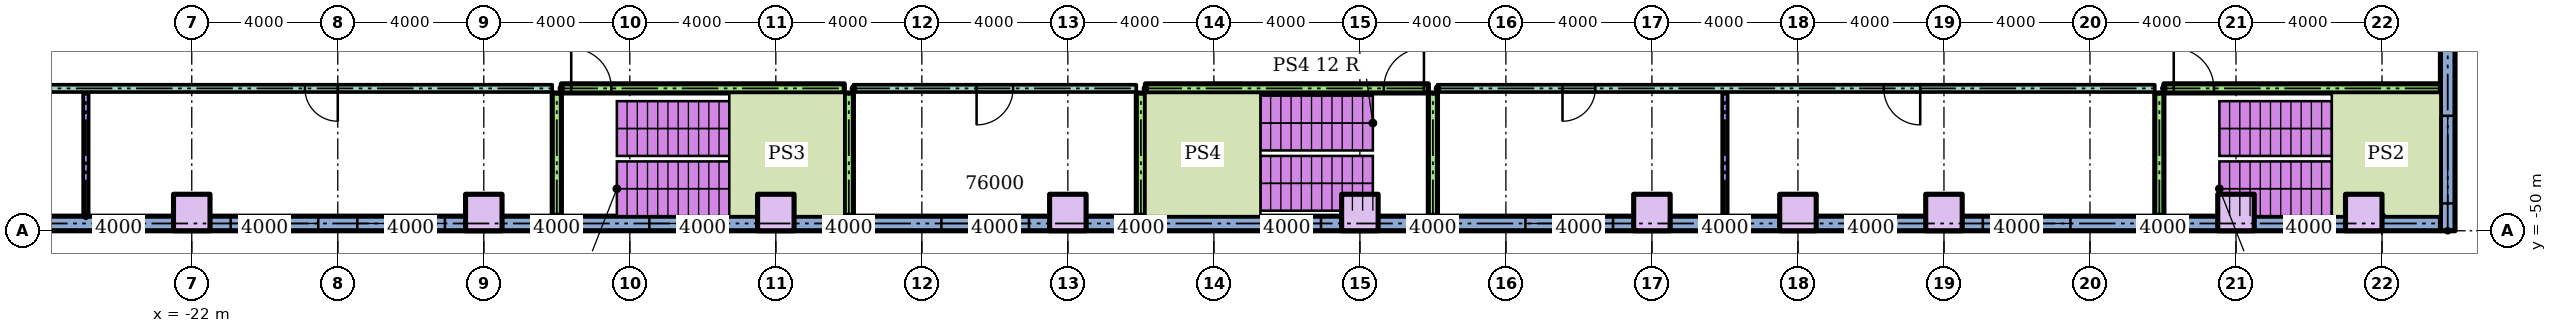
"""IFC4 building model, lengths in metres.
Left out: names, types, materials, properties, quantities, classifications, styles, units other than length and angle.
Written with IfcOpenShell. Run it as: python <this file> out.ifc"""

import sys

from ifc_helpers import new_model, si_unit, direction, frame, frame_2d, origin, origin_2d, place, context, subcontext, project, spatial, rectangle, extrude, element, fill, save


model = new_model("IFC4")
c1 = context("Model", 3, precision=1e-05, world=origin(), true_north=direction((0.0, 1.0)))
c2 = subcontext(c1, "Body", "Model", "MODEL_VIEW")
j1 = project(units=[si_unit("LENGTHUNIT", "METRE"), si_unit("PLANEANGLEUNIT", "RADIAN")], contexts=[c1])
p1 = place(None, origin())
s1 = spatial("IfcSite", under=j1, at=p1, CompositionType="ELEMENT")
p2 = place(p1, origin())
s2 = spatial("IfcBuilding", under=s1, at=p2, CompositionType="ELEMENT")
p3 = place(p2, frame((0.0, 0.0, 6.0)))
s3 = spatial("IfcBuildingStorey", under=s2, at=p3, CompositionType="ELEMENT", Elevation=6.0)
for number, where in (
    (1, (-22.0, -49.5, 0.0)),
    (2, (-14.0, -49.5, 0.0)),
    (3, (-6.0, -49.5, 0.0)),
    (4, (2.0, -49.5, 0.0)),
    (5, (10.0, -49.5, 0.0)),
    (6, (18.0, -49.5, 0.0)),
    (7, (22.0, -49.5, 0.0)),
    (8, (26.0, -49.5, 0.0)),
    (9, (34.0, -49.5, 0.0)),
    (10, (37.5, -49.5, 0.0)),
):
    element("IfcColumn", number, at=place(p3, frame(where)), inside=s3, PredefinedType="COLUMN", context=c2, shape_type="SweptSolid", body=[
        extrude(rectangle(XDim=1.0, YDim=1.0, at=origin_2d()), origin(), (0.0, 0.0, 1.0), 4.0),
    ])
p4 = place(p3, frame((39.8, -50.0, 0.0), z_axis=(0.0, 0.0, 1.0), x_axis=(0.0, 1.0, 0.0)))
e11 = element("IfcWall", 11, at=p4, inside=s3, PredefinedType="STANDARD", context=c2, shape_type="SweptSolid", body=[
    extrude(rectangle(XDim=70.0, YDim=0.4, at=frame_2d((35.0, 0.0))), origin(), (0.0, 0.0, 1.0), 3.7),
])
p5 = place(p4, frame((0.75, 0.0, 0.9)))
e12 = element("IfcOpeningElement", 12, at=p5, cuts=e11, PredefinedType="OPENING", context=c2, shape_type="SweptSolid", body=[
    extrude(rectangle(XDim=2.4, YDim=2.1, at=frame_2d((1.2, 1.05))), frame((0.0, 0.21, 0.0), z_axis=(0.0, -1.0, 0.0), x_axis=(1.0, 0.0, 0.0)), (0.0, 0.0, 1.0), 0.42),
])
p6 = place(p4, frame((6.633, 0.0, 0.9)))
e13 = element("IfcOpeningElement", 13, at=p6, cuts=e11, PredefinedType="OPENING", context=c2, shape_type="SweptSolid", body=[
    extrude(rectangle(XDim=2.4, YDim=2.1, at=frame_2d((1.2, 1.05))), frame((0.0, 0.21, 0.0), z_axis=(0.0, -1.0, 0.0), x_axis=(1.0, 0.0, 0.0)), (0.0, 0.0, 1.0), 0.42),
])
p7 = place(p4, frame((10.3, 0.0, 0.9)))
e14 = element("IfcOpeningElement", 14, at=p7, cuts=e11, PredefinedType="OPENING", context=c2, shape_type="SweptSolid", body=[
    extrude(rectangle(XDim=2.4, YDim=2.1, at=frame_2d((1.2, 1.05))), frame((0.0, 0.21, 0.0), z_axis=(0.0, -1.0, 0.0), x_axis=(1.0, 0.0, 0.0)), (0.0, 0.0, 1.0), 0.42),
])
p8 = place(p4, frame((13.967, 0.0, 0.9)))
e15 = element("IfcOpeningElement", 15, at=p8, cuts=e11, PredefinedType="OPENING", context=c2, shape_type="SweptSolid", body=[
    extrude(rectangle(XDim=2.4, YDim=2.1, at=frame_2d((1.2, 1.05))), frame((0.0, 0.21, 0.0), z_axis=(0.0, -1.0, 0.0), x_axis=(1.0, 0.0, 0.0)), (0.0, 0.0, 1.0), 0.42),
])
p9 = place(p4, frame((28.863, 0.0, 0.9)))
e16 = element("IfcOpeningElement", 16, at=p9, cuts=e11, PredefinedType="OPENING", context=c2, shape_type="SweptSolid", body=[
    extrude(rectangle(XDim=2.4, YDim=2.1, at=frame_2d((1.2, 1.05))), frame((0.0, 0.21, 0.0), z_axis=(0.0, -1.0, 0.0), x_axis=(1.0, 0.0, 0.0)), (0.0, 0.0, 1.0), 0.42),
])
p10 = place(p4, frame((32.988, 0.0, 0.9)))
e17 = element("IfcOpeningElement", 17, at=p10, cuts=e11, PredefinedType="OPENING", context=c2, shape_type="SweptSolid", body=[
    extrude(rectangle(XDim=2.4, YDim=2.1, at=frame_2d((1.2, 1.05))), frame((0.0, 0.21, 0.0), z_axis=(0.0, -1.0, 0.0), x_axis=(1.0, 0.0, 0.0)), (0.0, 0.0, 1.0), 0.42),
])
p11 = place(p4, frame((37.113, 0.0, 0.9)))
e18 = element("IfcOpeningElement", 18, at=p11, cuts=e11, PredefinedType="OPENING", context=c2, shape_type="SweptSolid", body=[
    extrude(rectangle(XDim=2.4, YDim=2.1, at=frame_2d((1.2, 1.05))), frame((0.0, 0.21, 0.0), z_axis=(0.0, -1.0, 0.0), x_axis=(1.0, 0.0, 0.0)), (0.0, 0.0, 1.0), 0.42),
])
p12 = place(p4, frame((41.238, 0.0, 0.9)))
e19 = element("IfcOpeningElement", 19, at=p12, cuts=e11, PredefinedType="OPENING", context=c2, shape_type="SweptSolid", body=[
    extrude(rectangle(XDim=2.4, YDim=2.1, at=frame_2d((1.2, 1.05))), frame((0.0, 0.21, 0.0), z_axis=(0.0, -1.0, 0.0), x_axis=(1.0, 0.0, 0.0)), (0.0, 0.0, 1.0), 0.42),
])
p13 = place(p4, frame((45.363, 0.0, 0.9)))
e20 = element("IfcOpeningElement", 20, at=p13, cuts=e11, PredefinedType="OPENING", context=c2, shape_type="SweptSolid", body=[
    extrude(rectangle(XDim=2.4, YDim=2.1, at=frame_2d((1.2, 1.05))), frame((0.0, 0.21, 0.0), z_axis=(0.0, -1.0, 0.0), x_axis=(1.0, 0.0, 0.0)), (0.0, 0.0, 1.0), 0.42),
])
p14 = place(p4, frame((49.488, 0.0, 0.9)))
e21 = element("IfcOpeningElement", 21, at=p14, cuts=e11, PredefinedType="OPENING", context=c2, shape_type="SweptSolid", body=[
    extrude(rectangle(XDim=2.4, YDim=2.1, at=frame_2d((1.2, 1.05))), frame((0.0, 0.21, 0.0), z_axis=(0.0, -1.0, 0.0), x_axis=(1.0, 0.0, 0.0)), (0.0, 0.0, 1.0), 0.42),
])
p15 = place(p4, frame((53.613, 0.0, 0.9)))
e22 = element("IfcOpeningElement", 22, at=p15, cuts=e11, PredefinedType="OPENING", context=c2, shape_type="SweptSolid", body=[
    extrude(rectangle(XDim=2.4, YDim=2.1, at=frame_2d((1.2, 1.05))), frame((0.0, 0.21, 0.0), z_axis=(0.0, -1.0, 0.0), x_axis=(1.0, 0.0, 0.0)), (0.0, 0.0, 1.0), 0.42),
])
p16 = place(p4, frame((57.738, 0.0, 0.9)))
e23 = element("IfcOpeningElement", 23, at=p16, cuts=e11, PredefinedType="OPENING", context=c2, shape_type="SweptSolid", body=[
    extrude(rectangle(XDim=2.4, YDim=2.1, at=frame_2d((1.2, 1.05))), frame((0.0, 0.21, 0.0), z_axis=(0.0, -1.0, 0.0), x_axis=(1.0, 0.0, 0.0)), (0.0, 0.0, 1.0), 0.42),
])
p17 = place(p4, frame((62.05, 0.0, 0.9)))
e24 = element("IfcOpeningElement", 24, at=p17, cuts=e11, PredefinedType="OPENING", context=c2, shape_type="SweptSolid", body=[
    extrude(rectangle(XDim=2.4, YDim=2.1, at=frame_2d((1.2, 1.05))), frame((0.0, 0.21, 0.0), z_axis=(0.0, -1.0, 0.0), x_axis=(1.0, 0.0, 0.0)), (0.0, 0.0, 1.0), 0.42),
])
p18 = place(p4, frame((66.55, 0.0, 0.9)))
e25 = element("IfcOpeningElement", 25, at=p18, cuts=e11, PredefinedType="OPENING", context=c2, shape_type="SweptSolid", body=[
    extrude(rectangle(XDim=2.4, YDim=2.1, at=frame_2d((1.2, 1.05))), frame((0.0, 0.21, 0.0), z_axis=(0.0, -1.0, 0.0), x_axis=(1.0, 0.0, 0.0)), (0.0, 0.0, 1.0), 0.42),
])
p19 = place(p3, frame((-39.6, -49.8, 0.0)))
e26 = element("IfcWall", 26, at=p19, inside=s3, PredefinedType="STANDARD", context=c2, shape_type="SweptSolid", body=[
    extrude(rectangle(XDim=79.2, YDim=0.4, at=frame_2d((39.6, 0.0))), origin(), (0.0, 0.0, 1.0), 3.7),
])
p20 = place(p19, frame((10.665, 0.0, 0.9)))
e27 = element("IfcOpeningElement", 27, at=p20, cuts=e26, PredefinedType="OPENING", context=c2, shape_type="SweptSolid", body=[
    extrude(rectangle(XDim=2.4, YDim=2.1, at=frame_2d((1.2, 1.05))), frame((0.0, 0.21, 0.0), z_axis=(0.0, -1.0, 0.0), x_axis=(1.0, 0.0, 0.0)), (0.0, 0.0, 1.0), 0.42),
])
p21 = place(p19, frame((18.665, 0.0, 0.9)))
e28 = element("IfcOpeningElement", 28, at=p21, cuts=e26, PredefinedType="OPENING", context=c2, shape_type="SweptSolid", body=[
    extrude(rectangle(XDim=2.4, YDim=2.1, at=frame_2d((1.2, 1.05))), frame((0.0, 0.21, 0.0), z_axis=(0.0, -1.0, 0.0), x_axis=(1.0, 0.0, 0.0)), (0.0, 0.0, 1.0), 0.42),
])
p22 = place(p19, frame((22.135, 0.0, 0.9)))
e29 = element("IfcOpeningElement", 29, at=p22, cuts=e26, PredefinedType="OPENING", context=c2, shape_type="SweptSolid", body=[
    extrude(rectangle(XDim=2.4, YDim=2.1, at=frame_2d((1.2, 1.05))), frame((0.0, 0.21, 0.0), z_axis=(0.0, -1.0, 0.0), x_axis=(1.0, 0.0, 0.0)), (0.0, 0.0, 1.0), 0.42),
])
p23 = place(p19, frame((30.135, 0.0, 0.9)))
e30 = element("IfcOpeningElement", 30, at=p23, cuts=e26, PredefinedType="OPENING", context=c2, shape_type="SweptSolid", body=[
    extrude(rectangle(XDim=2.05, YDim=2.1, at=frame_2d((1.025, 1.05))), frame((0.0, 0.21, 0.0), z_axis=(0.0, -1.0, 0.0), x_axis=(1.0, 0.0, 0.0)), (0.0, 0.0, 1.0), 0.42),
])
p24 = place(p19, frame((38.135, 0.0, 0.9)))
e31 = element("IfcOpeningElement", 31, at=p24, cuts=e26, PredefinedType="OPENING", context=c2, shape_type="SweptSolid", body=[
    extrude(rectangle(XDim=2.4, YDim=2.1, at=frame_2d((1.2, 1.05))), frame((0.0, 0.21, 0.0), z_axis=(0.0, -1.0, 0.0), x_axis=(1.0, 0.0, 0.0)), (0.0, 0.0, 1.0), 0.42),
])
p25 = place(p19, frame((47.015, 0.0, 0.9)))
e32 = element("IfcOpeningElement", 32, at=p25, cuts=e26, PredefinedType="OPENING", context=c2, shape_type="SweptSolid", body=[
    extrude(rectangle(XDim=1.52, YDim=2.1, at=frame_2d((0.76, 1.05))), frame((0.0, 0.21, 0.0), z_axis=(0.0, -1.0, 0.0), x_axis=(1.0, 0.0, 0.0)), (0.0, 0.0, 1.0), 0.42),
])
p26 = place(p19, frame((54.135, 0.0, 0.9)))
e33 = element("IfcOpeningElement", 33, at=p26, cuts=e26, PredefinedType="OPENING", context=c2, shape_type="SweptSolid", body=[
    extrude(rectangle(XDim=2.4, YDim=2.1, at=frame_2d((1.2, 1.05))), frame((0.0, 0.21, 0.0), z_axis=(0.0, -1.0, 0.0), x_axis=(1.0, 0.0, 0.0)), (0.0, 0.0, 1.0), 0.42),
])
p27 = place(p19, frame((66.665, 0.0, 0.9)))
e34 = element("IfcOpeningElement", 34, at=p27, cuts=e26, PredefinedType="OPENING", context=c2, shape_type="SweptSolid", body=[
    extrude(rectangle(XDim=2.4, YDim=2.1, at=frame_2d((1.2, 1.05))), frame((0.0, 0.21, 0.0), z_axis=(0.0, -1.0, 0.0), x_axis=(1.0, 0.0, 0.0)), (0.0, 0.0, 1.0), 0.42),
])
p28 = place(p3, frame((-31.775, -46.1, 0.0)))
e35 = element("IfcWall", 35, at=p28, inside=s3, PredefinedType="PARTITIONING", context=c2, shape_type="SweptSolid", body=[
    extrude(rectangle(XDim=19.65, YDim=0.2, at=frame_2d((9.825, 0.0))), origin(), (0.0, 0.0, 1.0), 3.7),
])
p29 = place(p28, frame((2.925, 0.0, 0.0)))
e36 = element("IfcOpeningElement", 36, at=p29, cuts=e35, PredefinedType="OPENING", context=c2, shape_type="SweptSolid", body=[
    extrude(rectangle(XDim=0.9, YDim=2.1, at=frame_2d((0.45, 1.05))), frame((0.0, 0.11, 0.0), z_axis=(0.0, -1.0, 0.0), x_axis=(1.0, 0.0, 0.0)), (0.0, 0.0, 1.0), 0.22),
])
p30 = place(p28, frame((12.875, 0.0, 0.0)))
e37 = element("IfcOpeningElement", 37, at=p30, cuts=e35, PredefinedType="OPENING", context=c2, shape_type="SweptSolid", body=[
    extrude(rectangle(XDim=0.9, YDim=2.1, at=frame_2d((0.45, 1.05))), frame((0.0, 0.11, 0.0), z_axis=(0.0, -1.0, 0.0), x_axis=(1.0, 0.0, 0.0)), (0.0, 0.0, 1.0), 0.22),
])
p31 = place(p3, frame((-3.875, -46.1, 0.0)))
e38 = element("IfcWall", 38, at=p31, inside=s3, PredefinedType="PARTITIONING", context=c2, shape_type="SweptSolid", body=[
    extrude(rectangle(XDim=7.75, YDim=0.2, at=frame_2d((3.875, 0.0))), origin(), (0.0, 0.0, 1.0), 3.7),
])
p32 = place(p31, frame((3.375, 0.0, 0.0)))
e39 = element("IfcOpeningElement", 39, at=p32, cuts=e38, PredefinedType="OPENING", context=c2, shape_type="SweptSolid", body=[
    extrude(rectangle(XDim=1.0, YDim=2.1, at=frame_2d((0.5, 1.05))), frame((0.0, 0.11, 0.0), z_axis=(0.0, -1.0, 0.0), x_axis=(1.0, 0.0, 0.0)), (0.0, 0.0, 1.0), 0.22),
])
p33 = place(p3, frame((12.125, -46.1, 0.0)))
e40 = element("IfcWall", 40, at=p33, inside=s3, PredefinedType="PARTITIONING", context=c2, shape_type="SweptSolid", body=[
    extrude(rectangle(XDim=19.65, YDim=0.2, at=frame_2d((9.825, 0.0))), origin(), (0.0, 0.0, 1.0), 3.7),
])
p34 = place(p33, frame((3.425, 0.0, 0.0)))
e41 = element("IfcOpeningElement", 41, at=p34, cuts=e40, PredefinedType="OPENING", context=c2, shape_type="SweptSolid", body=[
    extrude(rectangle(XDim=0.9, YDim=2.1, at=frame_2d((0.45, 1.05))), frame((0.0, 0.11, 0.0), z_axis=(0.0, -1.0, 0.0), x_axis=(1.0, 0.0, 0.0)), (0.0, 0.0, 1.0), 0.22),
])
p35 = place(p33, frame((12.225, 0.0, 0.0)))
e42 = element("IfcOpeningElement", 42, at=p35, cuts=e40, PredefinedType="OPENING", context=c2, shape_type="SweptSolid", body=[
    extrude(rectangle(XDim=1.0, YDim=2.1, at=frame_2d((0.5, 1.05))), frame((0.0, 0.11, 0.0), z_axis=(0.0, -1.0, 0.0), x_axis=(1.0, 0.0, 0.0)), (0.0, 0.0, 1.0), 0.22),
])
p36 = place(p3, frame((-11.875, -46.1, 0.0)))
e43 = element("IfcWall", 43, at=p36, inside=s3, PredefinedType="SOLIDWALL", context=c2, shape_type="SweptSolid", body=[
    extrude(rectangle(XDim=7.75, YDim=0.25, at=frame_2d((3.875, 0.0))), origin(), (0.0, 0.0, 1.0), 3.7),
])
p37 = place(p36, frame((0.27, 0.0, 0.0)))
e44 = element("IfcOpeningElement", 44, at=p37, cuts=e43, PredefinedType="OPENING", context=c2, shape_type="SweptSolid", body=[
    extrude(rectangle(XDim=1.1, YDim=2.1, at=frame_2d((0.55, 1.05))), frame((0.0, 0.135, 0.0), z_axis=(0.0, -1.0, 0.0), x_axis=(1.0, 0.0, 0.0)), (0.0, 0.0, 1.0), 0.27),
])
p38 = place(p3, frame((4.125, -46.1, 0.0)))
e45 = element("IfcWall", 45, at=p38, inside=s3, PredefinedType="SOLIDWALL", context=c2, shape_type="SweptSolid", body=[
    extrude(rectangle(XDim=7.75, YDim=0.25, at=frame_2d((3.875, 0.0))), origin(), (0.0, 0.0, 1.0), 3.7),
])
p39 = place(p38, frame((6.53, 0.0, 0.0)))
e46 = element("IfcOpeningElement", 46, at=p39, cuts=e45, PredefinedType="OPENING", context=c2, shape_type="SweptSolid", body=[
    extrude(rectangle(XDim=1.1, YDim=2.1, at=frame_2d((0.55, 1.05))), frame((0.0, 0.135, 0.0), z_axis=(0.0, -1.0, 0.0), x_axis=(1.0, 0.0, 0.0)), (0.0, 0.0, 1.0), 0.27),
])
p40 = place(p3, frame((32.025, -46.1, 0.0)))
e47 = element("IfcWall", 47, at=p40, inside=s3, PredefinedType="SOLIDWALL", context=c2, shape_type="SweptSolid", body=[
    extrude(rectangle(XDim=7.575, YDim=0.25, at=frame_2d((3.788, 0.0))), origin(), (0.0, 0.0, 1.0), 3.7),
])
p41 = place(p40, frame((0.27, 0.0, 0.0)))
e48 = element("IfcOpeningElement", 48, at=p41, cuts=e47, PredefinedType="OPENING", context=c2, shape_type="SweptSolid", body=[
    extrude(rectangle(XDim=1.1, YDim=2.1, at=frame_2d((0.55, 1.05))), frame((0.0, 0.135, 0.0), z_axis=(0.0, -1.0, 0.0), x_axis=(1.0, 0.0, 0.0)), (0.0, 0.0, 1.0), 0.27),
])
p42 = place(p3, frame((-24.9, -49.6, 0.0), z_axis=(0.0, 0.0, 1.0), x_axis=(0.0, 1.0, 0.0)))
e49 = element("IfcWall", 49, at=p42, inside=s3, PredefinedType="PARTITIONING", context=c2, shape_type="SweptSolid", body=[
    extrude(rectangle(XDim=3.4, YDim=0.15, at=frame_2d((1.7, 0.0))), origin(), (0.0, 0.0, 1.0), 3.7),
])
for number, where, z_axis, x_axis in (
    (50, (-12.0, -49.6, 0.0), (0.0, 0.0, 1.0), (0.0, 1.0, 0.0)),
    (51, (-4.0, -49.6, 0.0), (0.0, 0.0, 1.0), (0.0, 1.0, 0.0)),
    (52, (4.0, -49.6, 0.0), (0.0, 0.0, 1.0), (0.0, 1.0, 0.0)),
    (53, (12.0, -49.6, 0.0), (0.0, 0.0, 1.0), (0.0, 1.0, 0.0)),
):
    element("IfcWall", number, at=place(p3, frame(where, z_axis=z_axis, x_axis=x_axis)), inside=s3, PredefinedType="SOLIDWALL", context=c2, shape_type="SweptSolid", body=[
        extrude(rectangle(XDim=3.375, YDim=0.25, at=frame_2d((1.688, 0.0))), origin(), (0.0, 0.0, 1.0), 3.7),
    ])
p43 = place(p3, frame((20.0, -49.6, 0.0), z_axis=(0.0, 0.0, 1.0), x_axis=(0.0, 1.0, 0.0)))
e54 = element("IfcWall", 54, at=p43, inside=s3, PredefinedType="PARTITIONING", context=c2, shape_type="SweptSolid", body=[
    extrude(rectangle(XDim=3.4, YDim=0.15, at=frame_2d((1.7, 0.0))), origin(), (0.0, 0.0, 1.0), 3.7),
])
p44 = place(p3, frame((31.9, -49.6, 0.0), z_axis=(0.0, 0.0, 1.0), x_axis=(0.0, 1.0, 0.0)))
e55 = element("IfcWall", 55, at=p44, inside=s3, PredefinedType="SOLIDWALL", context=c2, shape_type="SweptSolid", body=[
    extrude(rectangle(XDim=3.375, YDim=0.25, at=frame_2d((1.688, 0.0))), origin(), (0.0, 0.0, 1.0), 3.7),
])
p45 = place(p5, origin())
e56 = element("IfcWindow", 56, at=p45, inside=s3, PartitioningType="SINGLE_PANEL", PredefinedType="WINDOW", context=c2, shape_type="SweptSolid", body=[
    extrude(rectangle(XDim=2.4, YDim=2.1, at=frame_2d((1.2, 1.05))), frame((0.0, 0.03, 0.0), z_axis=(0.0, -1.0, 0.0), x_axis=(1.0, 0.0, 0.0)), (0.0, 0.0, 1.0), 0.06),
])
fill(e12, e56)
p46 = place(p21, origin())
e57 = element("IfcWindow", 57, at=p46, inside=s3, PartitioningType="SINGLE_PANEL", PredefinedType="WINDOW", context=c2, shape_type="SweptSolid", body=[
    extrude(rectangle(XDim=2.4, YDim=2.1, at=frame_2d((1.2, 1.05))), frame((0.0, 0.03, 0.0), z_axis=(0.0, -1.0, 0.0), x_axis=(1.0, 0.0, 0.0)), (0.0, 0.0, 1.0), 0.06),
])
fill(e28, e57)
p47 = place(p22, origin())
e58 = element("IfcWindow", 58, at=p47, inside=s3, PartitioningType="SINGLE_PANEL", PredefinedType="WINDOW", context=c2, shape_type="SweptSolid", body=[
    extrude(rectangle(XDim=2.4, YDim=2.1, at=frame_2d((1.2, 1.05))), frame((0.0, 0.03, 0.0), z_axis=(0.0, -1.0, 0.0), x_axis=(1.0, 0.0, 0.0)), (0.0, 0.0, 1.0), 0.06),
])
fill(e29, e58)
p48 = place(p23, origin())
e59 = element("IfcWindow", 59, at=p48, inside=s3, PartitioningType="SINGLE_PANEL", PredefinedType="WINDOW", context=c2, shape_type="SweptSolid", body=[
    extrude(rectangle(XDim=2.05, YDim=2.1, at=frame_2d((1.025, 1.05))), frame((0.0, 0.03, 0.0), z_axis=(0.0, -1.0, 0.0), x_axis=(1.0, 0.0, 0.0)), (0.0, 0.0, 1.0), 0.06),
])
fill(e30, e59)
p49 = place(p24, origin())
e60 = element("IfcWindow", 60, at=p49, inside=s3, PartitioningType="SINGLE_PANEL", PredefinedType="WINDOW", context=c2, shape_type="SweptSolid", body=[
    extrude(rectangle(XDim=2.4, YDim=2.1, at=frame_2d((1.2, 1.05))), frame((0.0, 0.03, 0.0), z_axis=(0.0, -1.0, 0.0), x_axis=(1.0, 0.0, 0.0)), (0.0, 0.0, 1.0), 0.06),
])
fill(e31, e60)
p50 = place(p25, origin())
e61 = element("IfcWindow", 61, at=p50, inside=s3, PartitioningType="SINGLE_PANEL", PredefinedType="WINDOW", context=c2, shape_type="SweptSolid", body=[
    extrude(rectangle(XDim=1.52, YDim=2.1, at=frame_2d((0.76, 1.05))), frame((0.0, 0.03, 0.0), z_axis=(0.0, -1.0, 0.0), x_axis=(1.0, 0.0, 0.0)), (0.0, 0.0, 1.0), 0.06),
])
fill(e32, e61)
p51 = place(p26, origin())
e62 = element("IfcWindow", 62, at=p51, inside=s3, PartitioningType="SINGLE_PANEL", PredefinedType="WINDOW", context=c2, shape_type="SweptSolid", body=[
    extrude(rectangle(XDim=2.4, YDim=2.1, at=frame_2d((1.2, 1.05))), frame((0.0, 0.03, 0.0), z_axis=(0.0, -1.0, 0.0), x_axis=(1.0, 0.0, 0.0)), (0.0, 0.0, 1.0), 0.06),
])
fill(e33, e62)
p52 = place(p27, origin())
e63 = element("IfcWindow", 63, at=p52, inside=s3, PartitioningType="SINGLE_PANEL", PredefinedType="WINDOW", context=c2, shape_type="SweptSolid", body=[
    extrude(rectangle(XDim=2.4, YDim=2.1, at=frame_2d((1.2, 1.05))), frame((0.0, 0.03, 0.0), z_axis=(0.0, -1.0, 0.0), x_axis=(1.0, 0.0, 0.0)), (0.0, 0.0, 1.0), 0.06),
])
fill(e34, e63)
p53 = place(p30, frame((0.9, 0.0, 0.0), z_axis=(0.0, 0.0, 1.0), x_axis=(-1.0, 0.0, 0.0)))
e64 = element("IfcDoor", 64, at=p53, inside=s3, OperationType="SINGLE_SWING_RIGHT", PredefinedType="DOOR", context=c2, shape_type="SweptSolid", body=[
    extrude(rectangle(XDim=0.9, YDim=2.1, at=frame_2d((0.45, 1.05))), frame((0.0, 0.025, 0.0), z_axis=(0.0, -1.0, 0.0), x_axis=(1.0, 0.0, 0.0)), (0.0, 0.0, 1.0), 0.05),
])
fill(e37, e64)
p54 = place(p32, frame((1.0, 0.0, 0.0), z_axis=(0.0, 0.0, 1.0), x_axis=(-1.0, 0.0, 0.0)))
e65 = element("IfcDoor", 65, at=p54, inside=s3, OperationType="SINGLE_SWING_LEFT", PredefinedType="DOOR", context=c2, shape_type="SweptSolid", body=[
    extrude(rectangle(XDim=1.0, YDim=2.1, at=frame_2d((0.5, 1.05))), frame((0.0, 0.025, 0.0), z_axis=(0.0, -1.0, 0.0), x_axis=(1.0, 0.0, 0.0)), (0.0, 0.0, 1.0), 0.05),
])
fill(e39, e65)
p55 = place(p34, frame((0.9, 0.0, 0.0), z_axis=(0.0, 0.0, 1.0), x_axis=(-1.0, 0.0, 0.0)))
e66 = element("IfcDoor", 66, at=p55, inside=s3, OperationType="SINGLE_SWING_LEFT", PredefinedType="DOOR", context=c2, shape_type="SweptSolid", body=[
    extrude(rectangle(XDim=0.9, YDim=2.1, at=frame_2d((0.45, 1.05))), frame((0.0, 0.025, 0.0), z_axis=(0.0, -1.0, 0.0), x_axis=(1.0, 0.0, 0.0)), (0.0, 0.0, 1.0), 0.05),
])
fill(e41, e66)
p56 = place(p35, frame((1.0, 0.0, 0.0), z_axis=(0.0, 0.0, 1.0), x_axis=(-1.0, 0.0, 0.0)))
e67 = element("IfcDoor", 67, at=p56, inside=s3, OperationType="SINGLE_SWING_RIGHT", PredefinedType="DOOR", context=c2, shape_type="SweptSolid", body=[
    extrude(rectangle(XDim=1.0, YDim=2.1, at=frame_2d((0.5, 1.05))), frame((0.0, 0.025, 0.0), z_axis=(0.0, -1.0, 0.0), x_axis=(1.0, 0.0, 0.0)), (0.0, 0.0, 1.0), 0.05),
])
fill(e42, e67)
p57 = place(p41, origin())
e68 = element("IfcDoor", 68, at=p57, inside=s3, OperationType="SINGLE_SWING_LEFT", PredefinedType="DOOR", context=c2, shape_type="SweptSolid", body=[
    extrude(rectangle(XDim=1.1, YDim=2.1, at=frame_2d((0.55, 1.05))), frame((0.0, 0.025, 0.0), z_axis=(0.0, -1.0, 0.0), x_axis=(1.0, 0.0, 0.0)), (0.0, 0.0, 1.0), 0.05),
])
fill(e48, e68)
p58 = place(p37, origin())
e69 = element("IfcDoor", 69, at=p58, inside=s3, OperationType="SINGLE_SWING_LEFT", PredefinedType="DOOR", context=c2, shape_type="SweptSolid", body=[
    extrude(rectangle(XDim=1.1, YDim=2.1, at=frame_2d((0.55, 1.05))), frame((0.0, 0.025, 0.0), z_axis=(0.0, -1.0, 0.0), x_axis=(1.0, 0.0, 0.0)), (0.0, 0.0, 1.0), 0.05),
])
fill(e44, e69)
p59 = place(p39, origin())
e70 = element("IfcDoor", 70, at=p59, inside=s3, OperationType="SINGLE_SWING_RIGHT", PredefinedType="DOOR", context=c2, shape_type="SweptSolid", body=[
    extrude(rectangle(XDim=1.1, YDim=2.1, at=frame_2d((0.55, 1.05))), frame((0.0, 0.025, 0.0), z_axis=(0.0, -1.0, 0.0), x_axis=(1.0, 0.0, 0.0)), (0.0, 0.0, 1.0), 0.05),
])
fill(e46, e70)
save(model, sys.argv[1])
